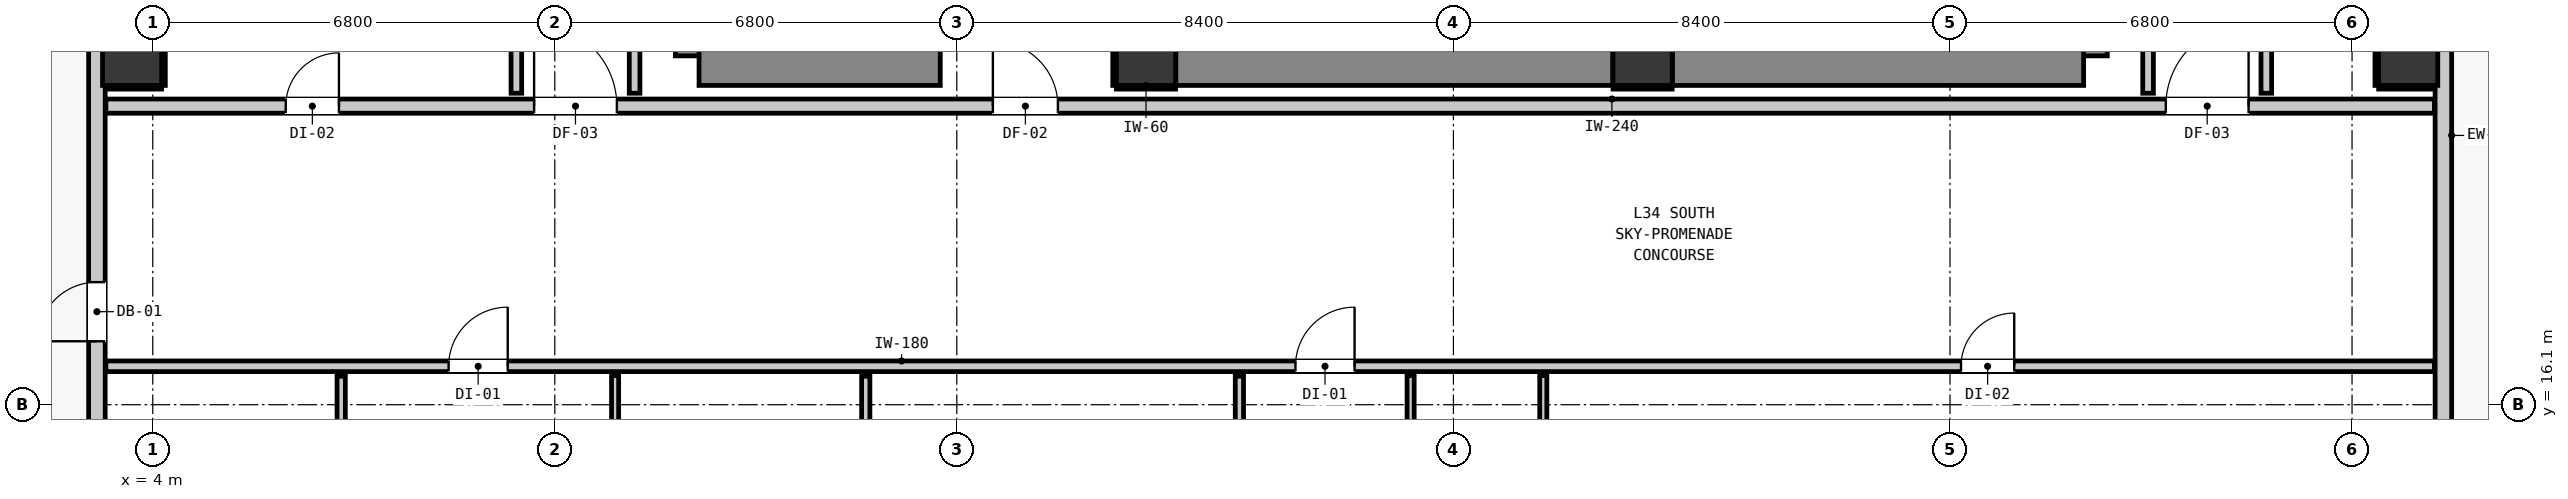
"""IFC4 building model, lengths in metres.
Left out: names, types, materials, properties, quantities, classifications, styles, units other than length and angle.
Written with IfcOpenShell. Run it as: python <this file> out.ifc"""

import sys

from ifc_helpers import new_model, si_unit, direction, frame, frame_2d, origin, origin_2d, place, context, subcontext, project, spatial, rectangle, extrude, element, fill, save


model = new_model("IFC4")
c1 = context("Model", 3, precision=1e-05, world=origin(), true_north=direction((0.0, 1.0)))
c2 = subcontext(c1, "Body", "Model", "MODEL_VIEW")
j1 = project(units=[si_unit("LENGTHUNIT", "METRE"), si_unit("PLANEANGLEUNIT", "RADIAN")], contexts=[c1])
p1 = place(None, origin())
s1 = spatial("IfcSite", under=j1, at=p1, CompositionType="ELEMENT")
p2 = place(p1, origin())
s2 = spatial("IfcBuilding", under=s1, at=p2, CompositionType="ELEMENT")
p3 = place(p2, frame((0.0, 0.0, 119.36)))
s3 = spatial("IfcBuildingStorey", under=s2, at=p3, CompositionType="ELEMENT", Elevation=119.36)
for number, where, z_axis, x_axis in (
    (1, (20.8, 22.0, 0.0), (0.0, 0.0, 1.0), (1.0, 0.0, 0.0)),
    (2, (29.2, 22.0, 0.0), (0.0, 0.0, 1.0), (1.0, 0.0, 0.0)),
):
    element("IfcColumn", number, at=place(p3, frame(where, z_axis=z_axis, x_axis=x_axis)), inside=s3, PredefinedType="COLUMN", context=c2, shape_type="SweptSolid", body=[
        extrude(rectangle(XDim=1.0, YDim=1.0, at=origin_2d()), origin(), (0.0, 0.0, 1.0), 3.32),
    ])
p4 = place(p3, frame((13.34, 22.0, 0.0), z_axis=(0.0, 0.0, 1.0), x_axis=(0.0, 1.0, 0.0)))
e3 = element("IfcWall", 3, at=p4, inside=s3, PredefinedType="SHEAR", context=c2, shape_type="SweptSolid", body=[
    extrude(rectangle(XDim=8.195, YDim=1.0, at=frame_2d((4.098, 0.0))), origin(), (0.0, 0.0, 1.0), 3.32),
])
p5 = place(p3, frame((13.24, 22.0, 0.0), z_axis=(0.0, 0.0, 1.0), x_axis=(1.0, 0.0, 0.0)))
e4 = element("IfcWall", 4, at=p5, inside=s3, PredefinedType="SHEAR", context=c2, shape_type="SweptSolid", body=[
    extrude(rectangle(XDim=4.08, YDim=1.0, at=frame_2d((2.04, 0.0))), origin(), (0.0, 0.0, 1.0), 3.32),
])
p6 = place(p3, frame((36.56, 22.0, 0.0), z_axis=(0.0, 0.0, 1.0), x_axis=(0.0, 1.0, 0.0)))
e5 = element("IfcWall", 5, at=p6, inside=s3, PredefinedType="SHEAR", context=c2, shape_type="SweptSolid", body=[
    extrude(rectangle(XDim=8.195, YDim=1.0, at=frame_2d((4.098, 0.0))), origin(), (0.0, 0.0, 1.0), 3.32),
])
p7 = place(p3, frame((29.705, 22.0, 0.0), z_axis=(0.0, 0.0, 1.0), x_axis=(1.0, 0.0, 0.0)))
e6 = element("IfcWall", 6, at=p7, inside=s3, PredefinedType="SHEAR", context=c2, shape_type="SweptSolid", body=[
    extrude(rectangle(XDim=6.955, YDim=1.0, at=frame_2d((3.478, 0.0))), origin(), (0.0, 0.0, 1.0), 3.32),
])
p8 = place(p3, frame((21.305, 22.0, 0.0), z_axis=(0.0, 0.0, 1.0), x_axis=(1.0, 0.0, 0.0)))
e7 = element("IfcWall", 7, at=p8, inside=s3, PredefinedType="SHEAR", context=c2, shape_type="SweptSolid", body=[
    extrude(rectangle(XDim=7.39, YDim=1.0, at=frame_2d((3.695, 0.0))), origin(), (0.0, 0.0, 1.0), 3.32),
])
for number, where, z_axis, x_axis in (
    (8, (3.65, 22.0, 0.0), (0.0, 0.0, 1.0), (1.0, 0.0, 0.0)),
    (9, (42.15, 22.0, 0.0), (0.0, 0.0, 1.0), (1.0, 0.0, 0.0)),
):
    element("IfcColumn", number, at=place(p3, frame(where, z_axis=z_axis, x_axis=x_axis)), inside=s3, PredefinedType="COLUMN", context=c2, shape_type="SweptSolid", body=[
        extrude(rectangle(XDim=1.0, YDim=1.0, at=origin_2d()), origin(), (0.0, 0.0, 1.0), 3.32),
    ])
p9 = place(p3, frame((3.055, 11.355, 0.0), z_axis=(0.0, 0.0, 1.0), x_axis=(0.0, 1.0, 0.0)))
e10 = element("IfcWall", 10, at=p9, inside=s3, PredefinedType="STANDARD", context=c2, shape_type="SweptSolid", body=[
    extrude(rectangle(XDim=32.29, YDim=0.28, at=frame_2d((16.145, 0.0))), origin(), (0.0, 0.0, 1.0), 3.08),
])
p10 = place(p9, frame((5.818, 0.0, 0.0)))
e11 = element("IfcOpeningElement", 11, at=p10, cuts=e10, PredefinedType="OPENING", context=c2, shape_type="SweptSolid", body=[
    extrude(rectangle(XDim=1.0, YDim=2.15, at=frame_2d((0.5, 1.075))), frame((0.0, 0.15, 0.0), z_axis=(0.0, -1.0, 0.0), x_axis=(1.0, 0.0, 0.0)), (0.0, 0.0, 1.0), 0.3),
])
p11 = place(p9, frame((0.545, 0.0, 0.85)))
e12 = element("IfcOpeningElement", 12, at=p11, cuts=e10, PredefinedType="OPENING", context=c2, shape_type="SweptSolid", body=[
    extrude(rectangle(XDim=1.05, YDim=1.65, at=frame_2d((0.525, 0.825))), frame((0.0, 0.15, 0.0), z_axis=(0.0, -1.0, 0.0), x_axis=(1.0, 0.0, 0.0)), (0.0, 0.0, 1.0), 0.3),
])
p12 = place(p9, frame((13.495, 0.0, 0.85)))
e13 = element("IfcOpeningElement", 13, at=p12, cuts=e10, PredefinedType="OPENING", context=c2, shape_type="SweptSolid", body=[
    extrude(rectangle(XDim=3.0, YDim=2.1, at=frame_2d((1.5, 1.05))), frame((0.0, 0.15, 0.0), z_axis=(0.0, -1.0, 0.0), x_axis=(1.0, 0.0, 0.0)), (0.0, 0.0, 1.0), 0.3),
])
p13 = place(p3, frame((42.745, 43.645, 0.0), z_axis=(0.0, 0.0, 1.0), x_axis=(0.0, -1.0, 0.0)))
e14 = element("IfcWall", 14, at=p13, inside=s3, PredefinedType="STANDARD", context=c2, shape_type="SweptSolid", body=[
    extrude(rectangle(XDim=32.29, YDim=0.28, at=frame_2d((16.145, 0.0))), origin(), (0.0, 0.0, 1.0), 3.08),
])
p14 = place(p13, frame((5.467, 0.0, 0.0)))
e15 = element("IfcOpeningElement", 15, at=p14, cuts=e14, PredefinedType="OPENING", context=c2, shape_type="SweptSolid", body=[
    extrude(rectangle(XDim=1.0, YDim=2.15, at=frame_2d((0.5, 1.075))), frame((0.0, 0.15, 0.0), z_axis=(0.0, -1.0, 0.0), x_axis=(1.0, 0.0, 0.0)), (0.0, 0.0, 1.0), 0.3),
])
p15 = place(p13, frame((28.098, 0.0, 0.85)))
e16 = element("IfcOpeningElement", 16, at=p15, cuts=e14, PredefinedType="OPENING", context=c2, shape_type="SweptSolid", body=[
    extrude(rectangle(XDim=3.0, YDim=2.1, at=frame_2d((1.5, 1.05))), frame((0.0, 0.15, 0.0), z_axis=(0.0, -1.0, 0.0), x_axis=(1.0, 0.0, 0.0)), (0.0, 0.0, 1.0), 0.3),
])
p16 = place(p13, frame((0.318, 0.0, 0.85)))
e17 = element("IfcOpeningElement", 17, at=p16, cuts=e14, PredefinedType="OPENING", context=c2, shape_type="SweptSolid", body=[
    extrude(rectangle(XDim=1.05, YDim=1.65, at=frame_2d((0.525, 0.825))), frame((0.0, 0.15, 0.0), z_axis=(0.0, -1.0, 0.0), x_axis=(1.0, 0.0, 0.0)), (0.0, 0.0, 1.0), 0.3),
])
p17 = place(p13, frame((14.883, 0.0, 0.85)))
e18 = element("IfcOpeningElement", 18, at=p17, cuts=e14, PredefinedType="OPENING", context=c2, shape_type="SweptSolid", body=[
    extrude(rectangle(XDim=3.0, YDim=2.1, at=frame_2d((1.5, 1.05))), frame((0.0, 0.15, 0.0), z_axis=(0.0, -1.0, 0.0), x_axis=(1.0, 0.0, 0.0)), (0.0, 0.0, 1.0), 0.3),
])
p18 = place(p3, frame((3.207, 21.15, 0.0), z_axis=(0.0, 0.0, 1.0), x_axis=(1.0, 0.0, 0.0)))
e19 = element("IfcWall", 19, at=p18, inside=s3, PredefinedType="PARTITIONING", context=c2, shape_type="SweptSolid", body=[
    extrude(rectangle(XDim=39.386, YDim=0.24, at=frame_2d((19.693, 0.0))), origin(), (0.0, 0.0, 1.0), 3.08),
])
p19 = place(p18, frame((15.003, 0.0, 0.0)))
e20 = element("IfcOpeningElement", 20, at=p19, cuts=e19, PredefinedType="OPENING", context=c2, shape_type="SweptSolid", body=[
    extrude(rectangle(XDim=1.1, YDim=2.15, at=frame_2d((0.55, 1.075))), frame((0.0, 0.13, 0.0), z_axis=(0.0, -1.0, 0.0), x_axis=(1.0, 0.0, 0.0)), (0.0, 0.0, 1.0), 0.26),
])
p20 = place(p18, frame((7.243, 0.0, 0.0)))
e21 = element("IfcOpeningElement", 21, at=p20, cuts=e19, PredefinedType="OPENING", context=c2, shape_type="SweptSolid", body=[
    extrude(rectangle(XDim=1.4, YDim=2.15, at=frame_2d((0.7, 1.075))), frame((0.0, 0.13, 0.0), z_axis=(0.0, -1.0, 0.0), x_axis=(1.0, 0.0, 0.0)), (0.0, 0.0, 1.0), 0.26),
])
p21 = place(p18, frame((34.843, 0.0, 0.0)))
e22 = element("IfcOpeningElement", 22, at=p21, cuts=e19, PredefinedType="OPENING", context=c2, shape_type="SweptSolid", body=[
    extrude(rectangle(XDim=1.4, YDim=2.15, at=frame_2d((0.7, 1.075))), frame((0.0, 0.13, 0.0), z_axis=(0.0, -1.0, 0.0), x_axis=(1.0, 0.0, 0.0)), (0.0, 0.0, 1.0), 0.26),
])
p22 = place(p18, frame((3.042, 0.0, 0.0)))
e23 = element("IfcOpeningElement", 23, at=p22, cuts=e19, PredefinedType="OPENING", context=c2, shape_type="SweptSolid", body=[
    extrude(rectangle(XDim=0.9, YDim=2.1, at=frame_2d((0.45, 1.05))), frame((0.0, 0.13, 0.0), z_axis=(0.0, -1.0, 0.0), x_axis=(1.0, 0.0, 0.0)), (0.0, 0.0, 1.0), 0.26),
])
p23 = place(p3, frame((3.207, 16.75, 0.0), z_axis=(0.0, 0.0, 1.0), x_axis=(1.0, 0.0, 0.0)))
e24 = element("IfcWall", 24, at=p23, inside=s3, PredefinedType="PARTITIONING", context=c2, shape_type="SweptSolid", body=[
    extrude(rectangle(XDim=39.386, YDim=0.18, at=frame_2d((19.693, 0.0))), origin(), (0.0, 0.0, 1.0), 3.08),
])
p24 = place(p23, frame((5.797, 0.0, 0.0)))
e25 = element("IfcOpeningElement", 25, at=p24, cuts=e24, PredefinedType="OPENING", context=c2, shape_type="SweptSolid", body=[
    extrude(rectangle(XDim=1.0, YDim=2.15, at=frame_2d((0.5, 1.075))), frame((0.0, 0.1, 0.0), z_axis=(0.0, -1.0, 0.0), x_axis=(1.0, 0.0, 0.0)), (0.0, 0.0, 1.0), 0.2),
])
p25 = place(p23, frame((20.121, 0.0, 0.0)))
e26 = element("IfcOpeningElement", 26, at=p25, cuts=e24, PredefinedType="OPENING", context=c2, shape_type="SweptSolid", body=[
    extrude(rectangle(XDim=1.0, YDim=2.15, at=frame_2d((0.5, 1.075))), frame((0.0, 0.1, 0.0), z_axis=(0.0, -1.0, 0.0), x_axis=(1.0, 0.0, 0.0)), (0.0, 0.0, 1.0), 0.2),
])
p26 = place(p23, frame((31.379, 0.0, 0.0)))
e27 = element("IfcOpeningElement", 27, at=p26, cuts=e24, PredefinedType="OPENING", context=c2, shape_type="SweptSolid", body=[
    extrude(rectangle(XDim=0.9, YDim=2.1, at=frame_2d((0.45, 1.05))), frame((0.0, 0.1, 0.0), z_axis=(0.0, -1.0, 0.0), x_axis=(1.0, 0.0, 0.0)), (0.0, 0.0, 1.0), 0.2),
])
p27 = place(p3, frame((10.15, 21.368, 0.0), z_axis=(0.0, 0.0, 1.0), x_axis=(0.0, 1.0, 0.0)))
e28 = element("IfcWall", 28, at=p27, inside=s3, PredefinedType="PARTITIONING", context=c2, shape_type="SweptSolid", body=[
    extrude(rectangle(XDim=11.874, YDim=0.18, at=frame_2d((5.937, 0.0))), origin(), (0.0, 0.0, 1.0), 3.08),
])
for number, where, z_axis, x_axis in (
    (29, (12.15, 21.368, 0.0), (0.0, 0.0, 1.0), (0.0, 1.0, 0.0)),
    (30, (37.75, 21.368, 0.0), (0.0, 0.0, 1.0), (0.0, 1.0, 0.0)),
):
    element("IfcWall", number, at=place(p3, frame(where, z_axis=z_axis, x_axis=x_axis)), inside=s3, PredefinedType="PARTITIONING", context=c2, shape_type="SweptSolid", body=[
        extrude(rectangle(XDim=18.694, YDim=0.18, at=frame_2d((9.347, 0.0))), origin(), (0.0, 0.0, 1.0), 3.08),
    ])
p28 = place(p3, frame((39.75, 21.368, 0.0), z_axis=(0.0, 0.0, 1.0), x_axis=(0.0, 1.0, 0.0)))
e31 = element("IfcWall", 31, at=p28, inside=s3, PredefinedType="PARTITIONING", context=c2, shape_type="SweptSolid", body=[
    extrude(rectangle(XDim=3.109, YDim=0.18, at=frame_2d((1.555, 0.0))), origin(), (0.0, 0.0, 1.0), 3.08),
])
p29 = place(p3, frame((7.187, 13.652, 0.0), z_axis=(0.0, 0.0, 1.0), x_axis=(0.0, 1.0, 0.0)))
e32 = element("IfcWall", 32, at=p29, inside=s3, PredefinedType="PARTITIONING", context=c2, shape_type="SweptSolid", body=[
    extrude(rectangle(XDim=2.93, YDim=0.14, at=frame_2d((1.465, 0.0))), origin(), (0.0, 0.0, 1.0), 3.08),
])
p30 = place(p29, frame((1.032, 0.0, 0.0)))
e33 = element("IfcOpeningElement", 33, at=p30, cuts=e32, PredefinedType="OPENING", context=c2, shape_type="SweptSolid", body=[
    extrude(rectangle(XDim=0.86, YDim=2.02, at=frame_2d((0.43, 1.01))), frame((0.0, 0.08, 0.0), z_axis=(0.0, -1.0, 0.0), x_axis=(1.0, 0.0, 0.0)), (0.0, 0.0, 1.0), 0.16),
])
p31 = place(p3, frame((16.06, 13.652, 0.0), z_axis=(0.0, 0.0, 1.0), x_axis=(0.0, 1.0, 0.0)))
e34 = element("IfcWall", 34, at=p31, inside=s3, PredefinedType="PARTITIONING", context=c2, shape_type="SweptSolid", body=[
    extrude(rectangle(XDim=2.93, YDim=0.14, at=frame_2d((1.465, 0.0))), origin(), (0.0, 0.0, 1.0), 3.08),
])
p32 = place(p3, frame((22.38, 13.652, 0.0), z_axis=(0.0, 0.0, 1.0), x_axis=(0.0, 1.0, 0.0)))
e35 = element("IfcWall", 35, at=p32, inside=s3, PredefinedType="PARTITIONING", context=c2, shape_type="SweptSolid", body=[
    extrude(rectangle(XDim=2.93, YDim=0.14, at=frame_2d((1.465, 0.0))), origin(), (0.0, 0.0, 1.0), 3.08),
])
p33 = place(p32, frame((1.032, 0.0, 0.0)))
e36 = element("IfcOpeningElement", 36, at=p33, cuts=e35, PredefinedType="OPENING", context=c2, shape_type="SweptSolid", body=[
    extrude(rectangle(XDim=0.86, YDim=2.02, at=frame_2d((0.43, 1.01))), frame((0.0, 0.08, 0.0), z_axis=(0.0, -1.0, 0.0), x_axis=(1.0, 0.0, 0.0)), (0.0, 0.0, 1.0), 0.16),
])
p34 = place(p3, frame((11.82, 9.207, 0.0), z_axis=(0.0, 0.0, 1.0), x_axis=(0.0, 1.0, 0.0)))
e37 = element("IfcWall", 37, at=p34, inside=s3, PredefinedType="PARTITIONING", context=c2, shape_type="SweptSolid", body=[
    extrude(rectangle(XDim=7.385, YDim=0.12, at=frame_2d((3.692, 0.0))), origin(), (0.0, 0.0, 1.0), 3.08),
])
p35 = place(p34, frame((3.318, 0.0, 0.0)))
e38 = element("IfcOpeningElement", 38, at=p35, cuts=e37, PredefinedType="OPENING", context=c2, shape_type="SweptSolid", body=[
    extrude(rectangle(XDim=0.9, YDim=2.1, at=frame_2d((0.45, 1.05))), frame((0.0, 0.07, 0.0), z_axis=(0.0, -1.0, 0.0), x_axis=(1.0, 0.0, 0.0)), (0.0, 0.0, 1.0), 0.14),
])
p36 = place(p3, frame((25.276, 9.207, 0.0), z_axis=(0.0, 0.0, 1.0), x_axis=(0.0, 1.0, 0.0)))
e39 = element("IfcWall", 39, at=p36, inside=s3, PredefinedType="PARTITIONING", context=c2, shape_type="SweptSolid", body=[
    extrude(rectangle(XDim=7.385, YDim=0.12, at=frame_2d((3.692, 0.0))), origin(), (0.0, 0.0, 1.0), 3.08),
])
p37 = place(p36, frame((3.318, 0.0, 0.0)))
e40 = element("IfcOpeningElement", 40, at=p37, cuts=e39, PredefinedType="OPENING", context=c2, shape_type="SweptSolid", body=[
    extrude(rectangle(XDim=0.9, YDim=2.1, at=frame_2d((0.45, 1.05))), frame((0.0, 0.07, 0.0), z_axis=(0.0, -1.0, 0.0), x_axis=(1.0, 0.0, 0.0)), (0.0, 0.0, 1.0), 0.14),
])
p38 = place(p3, frame((27.52, 9.207, 0.0), z_axis=(0.0, 0.0, 1.0), x_axis=(0.0, 1.0, 0.0)))
e41 = element("IfcWall", 41, at=p38, inside=s3, PredefinedType="PARTITIONING", context=c2, shape_type="SweptSolid", body=[
    extrude(rectangle(XDim=7.385, YDim=0.12, at=frame_2d((3.692, 0.0))), origin(), (0.0, 0.0, 1.0), 3.08),
])
for number, where, z_axis, x_axis in (
    (42, (20.3, 21.468, 0.0), (0.0, 0.0, 1.0), (1.0, 0.0, 0.0)),
    (43, (20.268, 21.5, 0.0), (0.0, 0.0, 1.0), (0.0, 1.0, 0.0)),
    (44, (28.7, 21.468, 0.0), (0.0, 0.0, 1.0), (1.0, 0.0, 0.0)),
):
    element("IfcWall", number, at=place(p3, frame(where, z_axis=z_axis, x_axis=x_axis)), inside=s3, PredefinedType="PARTITIONING", context=c2, shape_type="SweptSolid", body=[
        extrude(rectangle(XDim=1.0, YDim=0.06, at=frame_2d((0.5, 0.0))), origin(), (0.0, 0.0, 1.0), 1.45),
    ])
p39 = place(p3, frame((3.21, 21.468, 0.0), z_axis=(0.0, 0.0, 1.0), x_axis=(1.0, 0.0, 0.0)))
e45 = element("IfcWall", 45, at=p39, inside=s3, PredefinedType="PARTITIONING", context=c2, shape_type="SweptSolid", body=[
    extrude(rectangle(XDim=0.94, YDim=0.06, at=frame_2d((0.47, 0.0))), origin(), (0.0, 0.0, 1.0), 1.45),
])
p40 = place(p3, frame((4.182, 21.5, 0.0), z_axis=(0.0, 0.0, 1.0), x_axis=(0.0, 1.0, 0.0)))
e46 = element("IfcWall", 46, at=p40, inside=s3, PredefinedType="PARTITIONING", context=c2, shape_type="SweptSolid", body=[
    extrude(rectangle(XDim=1.0, YDim=0.06, at=frame_2d((0.5, 0.0))), origin(), (0.0, 0.0, 1.0), 1.45),
])
p41 = place(p3, frame((41.65, 21.468, 0.0), z_axis=(0.0, 0.0, 1.0), x_axis=(1.0, 0.0, 0.0)))
e47 = element("IfcWall", 47, at=p41, inside=s3, PredefinedType="PARTITIONING", context=c2, shape_type="SweptSolid", body=[
    extrude(rectangle(XDim=0.94, YDim=0.06, at=frame_2d((0.47, 0.0))), origin(), (0.0, 0.0, 1.0), 1.45),
])
p42 = place(p3, frame((41.618, 21.5, 0.0), z_axis=(0.0, 0.0, 1.0), x_axis=(0.0, 1.0, 0.0)))
e48 = element("IfcWall", 48, at=p42, inside=s3, PredefinedType="PARTITIONING", context=c2, shape_type="SweptSolid", body=[
    extrude(rectangle(XDim=1.0, YDim=0.06, at=frame_2d((0.5, 0.0))), origin(), (0.0, 0.0, 1.0), 1.45),
])
p43 = place(p10, origin())
e49 = element("IfcDoor", 49, at=p43, inside=s3, OperationType="SINGLE_SWING_LEFT", PredefinedType="DOOR", context=c2, shape_type="SweptSolid", body=[
    extrude(rectangle(XDim=1.0, YDim=2.15, at=frame_2d((0.5, 1.075))), frame((0.0, 0.025, 0.0), z_axis=(0.0, -1.0, 0.0), x_axis=(1.0, 0.0, 0.0)), (0.0, 0.0, 1.0), 0.05),
])
fill(e11, e49)
p44 = place(p19, origin())
e50 = element("IfcDoor", 50, at=p44, inside=s3, OperationType="SINGLE_SWING_LEFT", PredefinedType="DOOR", context=c2, shape_type="SweptSolid", body=[
    extrude(rectangle(XDim=1.1, YDim=2.15, at=frame_2d((0.55, 1.075))), frame((0.0, 0.025, 0.0), z_axis=(0.0, -1.0, 0.0), x_axis=(1.0, 0.0, 0.0)), (0.0, 0.0, 1.0), 0.05),
])
fill(e20, e50)
p45 = place(p20, origin())
e51 = element("IfcDoor", 51, at=p45, inside=s3, OperationType="SINGLE_SWING_LEFT", PredefinedType="DOOR", context=c2, shape_type="SweptSolid", body=[
    extrude(rectangle(XDim=1.4, YDim=2.15, at=frame_2d((0.7, 1.075))), frame((0.0, 0.025, 0.0), z_axis=(0.0, -1.0, 0.0), x_axis=(1.0, 0.0, 0.0)), (0.0, 0.0, 1.0), 0.05),
])
fill(e21, e51)
p46 = place(p21, origin())
e52 = element("IfcDoor", 52, at=p46, inside=s3, OperationType="SINGLE_SWING_RIGHT", PredefinedType="DOOR", context=c2, shape_type="SweptSolid", body=[
    extrude(rectangle(XDim=1.4, YDim=2.15, at=frame_2d((0.7, 1.075))), frame((0.0, 0.025, 0.0), z_axis=(0.0, -1.0, 0.0), x_axis=(1.0, 0.0, 0.0)), (0.0, 0.0, 1.0), 0.05),
])
fill(e22, e52)
p47 = place(p24, origin())
e53 = element("IfcDoor", 53, at=p47, inside=s3, OperationType="SINGLE_SWING_RIGHT", PredefinedType="DOOR", context=c2, shape_type="SweptSolid", body=[
    extrude(rectangle(XDim=1.0, YDim=2.15, at=frame_2d((0.5, 1.075))), frame((0.0, 0.025, 0.0), z_axis=(0.0, -1.0, 0.0), x_axis=(1.0, 0.0, 0.0)), (0.0, 0.0, 1.0), 0.05),
])
fill(e25, e53)
p48 = place(p25, origin())
e54 = element("IfcDoor", 54, at=p48, inside=s3, OperationType="SINGLE_SWING_RIGHT", PredefinedType="DOOR", context=c2, shape_type="SweptSolid", body=[
    extrude(rectangle(XDim=1.0, YDim=2.15, at=frame_2d((0.5, 1.075))), frame((0.0, 0.025, 0.0), z_axis=(0.0, -1.0, 0.0), x_axis=(1.0, 0.0, 0.0)), (0.0, 0.0, 1.0), 0.05),
])
fill(e26, e54)
p49 = place(p26, origin())
e55 = element("IfcDoor", 55, at=p49, inside=s3, OperationType="SINGLE_SWING_RIGHT", PredefinedType="DOOR", context=c2, shape_type="SweptSolid", body=[
    extrude(rectangle(XDim=0.9, YDim=2.1, at=frame_2d((0.45, 1.05))), frame((0.0, 0.025, 0.0), z_axis=(0.0, -1.0, 0.0), x_axis=(1.0, 0.0, 0.0)), (0.0, 0.0, 1.0), 0.05),
])
fill(e27, e55)
p50 = place(p22, origin())
e56 = element("IfcDoor", 56, at=p50, inside=s3, OperationType="SINGLE_SWING_RIGHT", PredefinedType="DOOR", context=c2, shape_type="SweptSolid", body=[
    extrude(rectangle(XDim=0.9, YDim=2.1, at=frame_2d((0.45, 1.05))), frame((0.0, 0.025, 0.0), z_axis=(0.0, -1.0, 0.0), x_axis=(1.0, 0.0, 0.0)), (0.0, 0.0, 1.0), 0.05),
])
fill(e23, e56)
save(model, sys.argv[1])
